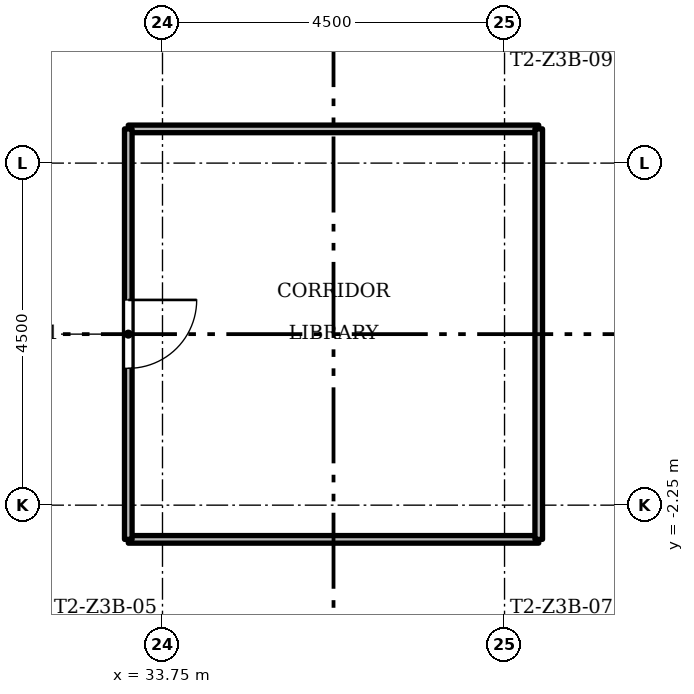
"""IFC4 building model, lengths in metres.
Left out: names, types, materials, properties, quantities, classifications, styles, units other than length and angle.
Written with IfcOpenShell. Run it as: python <this file> out.ifc"""

import sys

from ifc_helpers import new_model, si_unit, direction, frame, frame_2d, origin, place, context, subcontext, project, spatial, rectangle, extrude, element, fill, save


model = new_model("IFC4")
c1 = context("Model", 3, precision=1e-05, world=origin(), true_north=direction((0.0, 1.0)))
c2 = subcontext(c1, "Body", "Model", "MODEL_VIEW")
j1 = project(units=[si_unit("LENGTHUNIT", "METRE"), si_unit("PLANEANGLEUNIT", "RADIAN")], contexts=[c1])
p1 = place(None, origin())
s1 = spatial("IfcSite", under=j1, at=p1, CompositionType="ELEMENT")
p2 = place(p1, origin())
s2 = spatial("IfcBuilding", under=s1, at=p2, CompositionType="ELEMENT")
p3 = place(p2, frame((0.0, 0.0, 150.7)))
s3 = spatial("IfcBuildingStorey", under=s2, at=p3, CompositionType="ELEMENT", Elevation=150.7)
for number, where, z_axis, x_axis in (
    (1, (38.7, -2.7, 0.0), (0.0, 0.0, 1.0), (-1.0, 0.0, 0.0)),
    (2, (38.7, 2.7, 0.0), (0.0, 0.0, 1.0), (-1.0, 0.0, 0.0)),
    (3, (38.7, -2.7, 0.0), (0.0, 0.0, 1.0), (0.0, 1.0, 0.0)),
):
    element("IfcWall", number, at=place(p3, frame(where, z_axis=z_axis, x_axis=x_axis)), inside=s3, PredefinedType="PARTITIONING", context=c2, shape_type="SweptSolid", body=[
        extrude(rectangle(XDim=5.4, YDim=0.1, at=frame_2d((2.7, 0.0))), origin(), (0.0, 0.0, 1.0), 3.0),
    ])
p4 = place(p3, frame((33.3, -2.7, 0.0), z_axis=(0.0, 0.0, 1.0), x_axis=(0.0, 1.0, 0.0)))
e4 = element("IfcWall", 4, at=p4, inside=s3, PredefinedType="PARTITIONING", context=c2, shape_type="SweptSolid", body=[
    extrude(rectangle(XDim=5.4, YDim=0.1, at=frame_2d((2.7, 0.0))), origin(), (0.0, 0.0, 1.0), 3.0),
])
p5 = place(p4, frame((2.25, 0.0, 0.0)))
e5 = element("IfcOpeningElement", 5, at=p5, cuts=e4, PredefinedType="OPENING", context=c2, shape_type="SweptSolid", body=[
    extrude(rectangle(XDim=0.9, YDim=2.1, at=frame_2d((0.45, 1.05))), frame((0.0, 0.06, 0.0), z_axis=(0.0, -1.0, 0.0), x_axis=(1.0, 0.0, 0.0)), (0.0, 0.0, 1.0), 0.12),
])
p6 = place(p5, origin())
e6 = element("IfcDoor", 6, at=p6, inside=s3, OperationType="SINGLE_SWING_RIGHT", PredefinedType="DOOR", context=c2, shape_type="SweptSolid", body=[
    extrude(rectangle(XDim=0.9, YDim=2.1, at=frame_2d((0.45, 1.05))), frame((0.0, 0.025, 0.0), z_axis=(0.0, -1.0, 0.0), x_axis=(1.0, 0.0, 0.0)), (0.0, 0.0, 1.0), 0.05),
])
fill(e5, e6)
save(model, sys.argv[1])
